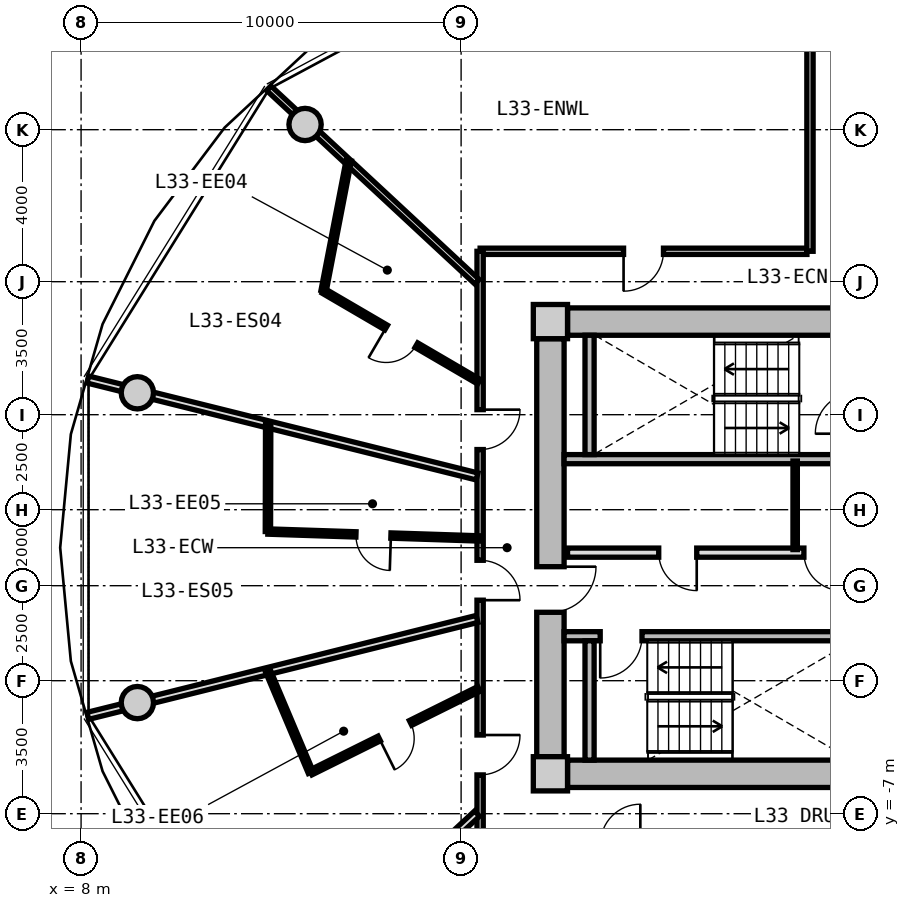
"""IFC4 building model, lengths in metres.
Left out: names, types, materials, properties, quantities, classifications, styles, units other than length and angle.
Written with IfcOpenShell. Run it as: python <this file> out.ifc"""

import sys

from ifc_helpers import new_model, si_unit, direction, frame, frame_2d, origin, origin_2d, place, context, subcontext, project, spatial, rectangle, circle, extrude, source, transform, mapped, element, fill, save


model = new_model("IFC4")
c1 = context("Model", 3, precision=1e-05, world=origin(), true_north=direction((0.0, 1.0)))
c2 = subcontext(c1, "Body", "Model", "MODEL_VIEW")
j1 = project(units=[si_unit("LENGTHUNIT", "METRE"), si_unit("PLANEANGLEUNIT", "RADIAN")], contexts=[c1])
p1 = place(None, origin())
s1 = spatial("IfcSite", under=j1, at=p1, CompositionType="ELEMENT")
p2 = place(p1, origin())
s2 = spatial("IfcBuilding", under=s1, at=p2, CompositionType="ELEMENT")
p3 = place(p2, frame((0.0, 0.0, 108.45)))
s3 = spatial("IfcBuildingStorey", under=s2, at=p3, CompositionType="ELEMENT", Elevation=108.45)
m1 = source(origin(), c2, "Body", "SweptSolid", [
    extrude(rectangle(XDim=0.9, YDim=0.9, at=origin_2d()), origin(), (0.0, 0.0, 1.0), 3.05),
])
for number, where, z_axis, x_axis in (
    (1, (20.35, -5.95, 0.0), (0.0, 0.0, 1.0), (1.0, 0.0, 0.0)),
    (2, (20.35, 5.95, 0.0), (0.0, 0.0, 1.0), (1.0, 0.0, 0.0)),
):
    element("IfcColumn", number, at=place(p3, frame(where, z_axis=z_axis, x_axis=x_axis)), inside=s3, PredefinedType="COLUMN", context=c2, shape_type="MappedRepresentation", body=[
        mapped(m1, transform((0.0, 0.0, 0.0), x_axis=(1.0, 0.0, 0.0), y_axis=(0.0, 1.0, 0.0), z_axis=(0.0, 0.0, 1.0), scale=1.0)),
    ])
m2 = source(origin(), c2, "Body", "SweptSolid", [
    extrude(rectangle(XDim=14.4, YDim=0.72, at=frame_2d((7.2, 0.0))), origin(), (0.0, 0.0, 1.0), 2.79),
])
for number, where, z_axis, x_axis in (
    (3, (20.8, 5.95, 0.0), (0.0, 0.0, 1.0), (1.0, 0.0, 0.0)),
    (4, (35.2, -5.95, 0.0), (0.0, 0.0, 1.0), (-1.0, 0.0, 0.0)),
):
    element("IfcWall", number, at=place(p3, frame(where, z_axis=z_axis, x_axis=x_axis)), inside=s3, PredefinedType="SHEAR", context=c2, shape_type="MappedRepresentation", body=[
        mapped(m2, transform((0.0, 0.0, 0.0), x_axis=(1.0, 0.0, 0.0), y_axis=(0.0, 1.0, 0.0), z_axis=(0.0, 0.0, 1.0), scale=1.0)),
    ])
m3 = source(origin(), c2, "Body", "SweptSolid", [
    extrude(rectangle(XDim=11.0, YDim=0.72, at=frame_2d((5.5, 0.0))), origin(), (0.0, 0.0, 1.0), 2.79),
])
p4 = place(p3, frame((20.35, -5.5, 0.0), z_axis=(0.0, 0.0, 1.0), x_axis=(0.0, 1.0, 0.0)))
e5 = element("IfcWall", 5, at=p4, inside=s3, PredefinedType="SHEAR", context=c2, shape_type="MappedRepresentation", body=[
    mapped(m3, transform((0.0, 0.0, 0.0), x_axis=(1.0, 0.0, 0.0), y_axis=(0.0, 1.0, 0.0), z_axis=(0.0, 0.0, 1.0), scale=1.0)),
])
p5 = place(p4, frame((3.8, 0.0, 0.0)))
e6 = element("IfcOpeningElement", 6, at=p5, cuts=e5, PredefinedType="OPENING", context=c2, shape_type="SweptSolid", body=[
    extrude(rectangle(XDim=1.2, YDim=2.15, at=frame_2d((0.6, 1.075))), frame((0.0, 0.37, 0.0), z_axis=(0.0, -1.0, 0.0), x_axis=(1.0, 0.0, 0.0)), (0.0, 0.0, 1.0), 0.74),
])
m4 = source(origin(), c2, "Body", "SweptSolid", [
    extrude(circle(Radius=0.425, at=origin_2d()), origin(), (0.0, 0.0, 1.0), 3.05),
])
for number, where, z_axis, x_axis in (
    (7, (13.894, 11.137, 0.0), (0.0, 0.0, 1.0), (1.0, 0.0, 0.0)),
    (8, (9.481, 4.076, 0.0), (0.0, 0.0, 1.0), (1.0, 0.0, 0.0)),
    (9, (9.481, -4.076, 0.0), (0.0, 0.0, 1.0), (1.0, 0.0, 0.0)),
):
    element("IfcColumn", number, at=place(p3, frame(where, z_axis=z_axis, x_axis=x_axis)), inside=s3, PredefinedType="COLUMN", context=c2, shape_type="MappedRepresentation", body=[
        mapped(m4, transform((0.0, 0.0, 0.0), x_axis=(1.0, 0.0, 0.0), y_axis=(0.0, 1.0, 0.0), z_axis=(0.0, 0.0, 1.0), scale=1.0)),
    ])
m5 = source(origin(), c2, "Body", "SweptSolid", [
    extrude(rectangle(XDim=7.83, YDim=0.24, at=frame_2d((3.915, 0.0))), origin(), (0.0, 0.0, 1.0), 2.79),
])
p6 = place(p3, frame((20.71, 2.33, 0.0), z_axis=(0.0, 0.0, 1.0), x_axis=(1.0, 0.0, 0.0)))
e10 = element("IfcWall", 10, at=p6, inside=s3, PredefinedType="PARTITIONING", context=c2, shape_type="MappedRepresentation", body=[
    mapped(m5, transform((0.0, 0.0, 0.0), x_axis=(1.0, 0.0, 0.0), y_axis=(0.0, 1.0, 0.0), z_axis=(0.0, 0.0, 1.0), scale=1.0)),
])
m6 = source(origin(), c2, "Body", "SweptSolid", [
    extrude(rectangle(XDim=3.14, YDim=0.24, at=frame_2d((1.57, 0.0))), origin(), (0.0, 0.0, 1.0), 2.79),
])
p7 = place(p3, frame((21.38, 2.45, 0.0), z_axis=(0.0, 0.0, 1.0), x_axis=(0.0, 1.0, 0.0)))
e11 = element("IfcWall", 11, at=p7, inside=s3, PredefinedType="PARTITIONING", context=c2, shape_type="MappedRepresentation", body=[
    mapped(m6, transform((0.0, 0.0, 0.0), x_axis=(1.0, 0.0, 0.0), y_axis=(0.0, 1.0, 0.0), z_axis=(0.0, 0.0, 1.0), scale=1.0)),
])
p8 = place(p3, frame((20.71, -2.33, 0.0), z_axis=(0.0, 0.0, 1.0), x_axis=(1.0, 0.0, 0.0)))
e12 = element("IfcWall", 12, at=p8, inside=s3, PredefinedType="PARTITIONING", context=c2, shape_type="MappedRepresentation", body=[
    mapped(m5, transform((0.0, 0.0, 0.0), x_axis=(1.0, 0.0, 0.0), y_axis=(0.0, 1.0, 0.0), z_axis=(0.0, 0.0, 1.0), scale=1.0)),
])
p9 = place(p8, frame((0.95, 0.0, 0.0)))
e13 = element("IfcOpeningElement", 13, at=p9, cuts=e12, PredefinedType="OPENING", context=c2, shape_type="SweptSolid", body=[
    extrude(rectangle(XDim=1.1, YDim=2.15, at=frame_2d((0.55, 1.075))), frame((0.0, 0.13, 0.0), z_axis=(0.0, -1.0, 0.0), x_axis=(1.0, 0.0, 0.0)), (0.0, 0.0, 1.0), 0.26),
])
p10 = place(p3, frame((21.38, -5.59, 0.0), z_axis=(0.0, 0.0, 1.0), x_axis=(0.0, 1.0, 0.0)))
e14 = element("IfcWall", 14, at=p10, inside=s3, PredefinedType="PARTITIONING", context=c2, shape_type="MappedRepresentation", body=[
    mapped(m6, transform((0.0, 0.0, 0.0), x_axis=(1.0, 0.0, 0.0), y_axis=(0.0, 1.0, 0.0), z_axis=(0.0, 0.0, 1.0), scale=1.0)),
])
m7 = source(origin(), c2, "Body", "SweptSolid", [
    extrude(rectangle(XDim=7.62, YDim=0.24, at=frame_2d((3.81, 0.0))), origin(), (0.0, 0.0, 1.0), 2.775),
])
p11 = place(p3, frame((20.8, -0.13, 0.0), z_axis=(0.0, 0.0, 1.0), x_axis=(1.0, 0.0, 0.0)))
e15 = element("IfcWall", 15, at=p11, inside=s3, PredefinedType="PARTITIONING", context=c2, shape_type="MappedRepresentation", body=[
    mapped(m7, transform((0.0, 0.0, 0.0), x_axis=(1.0, 0.0, 0.0), y_axis=(0.0, 1.0, 0.0), z_axis=(0.0, 0.0, 1.0), scale=1.0)),
])
p12 = place(p11, frame((6.22, 0.0, 0.0)))
e16 = element("IfcOpeningElement", 16, at=p12, cuts=e15, PredefinedType="OPENING", context=c2, shape_type="SweptSolid", body=[
    extrude(rectangle(XDim=1.0, YDim=2.1, at=frame_2d((0.5, 1.05))), frame((0.0, 0.13, 0.0), z_axis=(0.0, -1.0, 0.0), x_axis=(1.0, 0.0, 0.0)), (0.0, 0.0, 1.0), 0.26),
])
p13 = place(p11, frame((2.4, 0.0, 0.0)))
e17 = element("IfcOpeningElement", 17, at=p13, cuts=e15, PredefinedType="OPENING", context=c2, shape_type="SweptSolid", body=[
    extrude(rectangle(XDim=1.0, YDim=2.1, at=frame_2d((0.5, 1.05))), frame((0.0, 0.13, 0.0), z_axis=(0.0, -1.0, 0.0), x_axis=(1.0, 0.0, 0.0)), (0.0, 0.0, 1.0), 0.26),
])
m8 = source(origin(), c2, "Body", "SweptSolid", [
    extrude(rectangle(XDim=2.33, YDim=0.115, at=frame_2d((1.165, 0.0))), origin(), (0.0, 0.0, 1.0), 2.775),
])
p14 = place(p3, frame((26.79, -0.05, 0.0), z_axis=(0.0, 0.0, 1.0), x_axis=(0.0, 1.0, 0.0)))
e18 = element("IfcWall", 18, at=p14, inside=s3, PredefinedType="PARTITIONING", context=c2, shape_type="MappedRepresentation", body=[
    mapped(m8, transform((0.0, 0.0, 0.0), x_axis=(1.0, 0.0, 0.0), y_axis=(0.0, 1.0, 0.0), z_axis=(0.0, 0.0, 1.0), scale=1.0)),
])
m9 = source(origin(), c2, "Body", "SweptSolid", [
    extrude(rectangle(XDim=8.6, YDim=0.165, at=frame_2d((4.3, 0.0))), origin(), (0.0, 0.0, 1.0), 2.775),
])
p15 = place(p3, frame((18.5, 7.8, 0.0), z_axis=(0.0, 0.0, 1.0), x_axis=(1.0, 0.0, 0.0)))
e19 = element("IfcWall", 19, at=p15, inside=s3, PredefinedType="PARTITIONING", context=c2, shape_type="MappedRepresentation", body=[
    mapped(m9, transform((0.0, 0.0, 0.0), x_axis=(1.0, 0.0, 0.0), y_axis=(0.0, 1.0, 0.0), z_axis=(0.0, 0.0, 1.0), scale=1.0)),
])
p16 = place(p15, frame((3.775, 0.0, 0.0)))
e20 = element("IfcOpeningElement", 20, at=p16, cuts=e19, PredefinedType="OPENING", context=c2, shape_type="SweptSolid", body=[
    extrude(rectangle(XDim=1.05, YDim=2.15, at=frame_2d((0.525, 1.075))), frame((0.0, 0.093, 0.0), z_axis=(0.0, -1.0, 0.0), x_axis=(1.0, 0.0, 0.0)), (0.0, 0.0, 1.0), 0.185),
])
m10 = source(origin(), c2, "Body", "SweptSolid", [
    extrude(rectangle(XDim=15.6, YDim=0.165, at=frame_2d((7.8, 0.0))), origin(), (0.0, 0.0, 1.0), 2.775),
])
p17 = place(p3, frame((18.5, -7.8, 0.0), z_axis=(0.0, 0.0, 1.0), x_axis=(0.0, 1.0, 0.0)))
e21 = element("IfcWall", 21, at=p17, inside=s3, PredefinedType="PARTITIONING", context=c2, shape_type="MappedRepresentation", body=[
    mapped(m10, transform((0.0, 0.0, 0.0), x_axis=(1.0, 0.0, 0.0), y_axis=(0.0, 1.0, 0.0), z_axis=(0.0, 0.0, 1.0), scale=1.0)),
])
p18 = place(p17, frame((10.383, 0.0, 0.0)))
e22 = element("IfcOpeningElement", 22, at=p18, cuts=e21, PredefinedType="OPENING", context=c2, shape_type="SweptSolid", body=[
    extrude(rectangle(XDim=1.05, YDim=2.15, at=frame_2d((0.525, 1.075))), frame((0.0, 0.093, 0.0), z_axis=(0.0, -1.0, 0.0), x_axis=(1.0, 0.0, 0.0)), (0.0, 0.0, 1.0), 0.185),
])
p19 = place(p17, frame((6.419, 0.0, 0.0)))
e23 = element("IfcOpeningElement", 23, at=p19, cuts=e21, PredefinedType="OPENING", context=c2, shape_type="SweptSolid", body=[
    extrude(rectangle(XDim=1.05, YDim=2.15, at=frame_2d((0.525, 1.075))), frame((0.0, 0.093, 0.0), z_axis=(0.0, -1.0, 0.0), x_axis=(1.0, 0.0, 0.0)), (0.0, 0.0, 1.0), 0.185),
])
p20 = place(p17, frame((1.821, 0.0, 0.0)))
e24 = element("IfcOpeningElement", 24, at=p20, cuts=e21, PredefinedType="OPENING", context=c2, shape_type="SweptSolid", body=[
    extrude(rectangle(XDim=1.05, YDim=2.15, at=frame_2d((0.525, 1.075))), frame((0.0, 0.093, 0.0), z_axis=(0.0, -1.0, 0.0), x_axis=(1.0, 0.0, 0.0)), (0.0, 0.0, 1.0), 0.185),
])
m11 = source(origin(), c2, "Body", "SweptSolid", [
    extrude(rectangle(XDim=7.482, YDim=0.165, at=frame_2d((3.741, 0.0))), origin(), (0.0, 0.0, 1.0), 2.275),
])
p21 = place(p3, frame((18.42, 6.998, 0.0), z_axis=(0.0, 0.0, 1.0), x_axis=(-0.732508698043, 0.680757671489, 0.0)))
e25 = element("IfcWall", 25, at=p21, inside=s3, PredefinedType="PARTITIONING", context=c2, shape_type="MappedRepresentation", body=[
    mapped(m11, transform((0.0, 0.0, 0.0), x_axis=(1.0, 0.0, 0.0), y_axis=(0.0, 1.0, 0.0), z_axis=(0.0, 0.0, 1.0), scale=1.0)),
])
m12 = source(origin(), c2, "Body", "SweptSolid", [
    extrude(rectangle(XDim=7.56, YDim=0.165, at=frame_2d((3.78, 0.0))), origin(), (0.0, 0.0, 1.0), 2.775),
])
p22 = place(p3, frame((27.18, 7.8, 0.0), z_axis=(0.0, 0.0, 1.0), x_axis=(0.0, 1.0, 0.0)))
e26 = element("IfcWall", 26, at=p22, inside=s3, PredefinedType="PARTITIONING", context=c2, shape_type="MappedRepresentation", body=[
    mapped(m12, transform((0.0, 0.0, 0.0), x_axis=(1.0, 0.0, 0.0), y_axis=(0.0, 1.0, 0.0), z_axis=(0.0, 0.0, 1.0), scale=1.0)),
])
m13 = source(origin(), c2, "Body", "SweptSolid", [
    extrude(rectangle(XDim=10.556, YDim=0.19, at=frame_2d((5.278, 0.0))), origin(), (0.0, 0.0, 1.0), 2.275),
])
p23 = place(p3, frame((18.42, 1.875, 0.0), z_axis=(0.0, 0.0, 1.0), x_axis=(-0.970363857851, 0.241648470667, 0.0)))
e27 = element("IfcWall", 27, at=p23, inside=s3, PredefinedType="PARTITIONING", context=c2, shape_type="MappedRepresentation", body=[
    mapped(m13, transform((0.0, 0.0, 0.0), x_axis=(1.0, 0.0, 0.0), y_axis=(0.0, 1.0, 0.0), z_axis=(0.0, 0.0, 1.0), scale=1.0)),
])
m14 = source(origin(), c2, "Body", "SweptSolid", [
    extrude(rectangle(XDim=4.735, YDim=0.14, at=frame_2d((2.368, 0.0))), origin(), (0.0, 0.0, 1.0), 2.775),
])
p24 = place(p3, frame((18.47, 4.368, 0.0), z_axis=(0.0, 0.0, 1.0), x_axis=(-0.863537576642, 0.504284496814, 0.0)))
e28 = element("IfcWall", 28, at=p24, inside=s3, PredefinedType="PARTITIONING", context=c2, shape_type="MappedRepresentation", body=[
    mapped(m14, transform((0.0, 0.0, 0.0), x_axis=(1.0, 0.0, 0.0), y_axis=(0.0, 1.0, 0.0), z_axis=(0.0, 0.0, 1.0), scale=1.0)),
])
p25 = place(p24, frame((1.908, 0.0, 0.0)))
e29 = element("IfcOpeningElement", 29, at=p25, cuts=e28, PredefinedType="OPENING", context=c2, shape_type="SweptSolid", body=[
    extrude(rectangle(XDim=0.92, YDim=2.1, at=frame_2d((0.46, 1.05))), frame((0.0, 0.08, 0.0), z_axis=(0.0, -1.0, 0.0), x_axis=(1.0, 0.0, 0.0)), (0.0, 0.0, 1.0), 0.16),
])
m15 = source(origin(), c2, "Body", "SweptSolid", [
    extrude(rectangle(XDim=3.499, YDim=0.14, at=frame_2d((1.75, 0.0))), origin(), (0.0, 0.0, 1.0), 2.775),
])
p26 = place(p3, frame((14.381, 6.756, 0.0), z_axis=(0.0, 0.0, 1.0), x_axis=(0.18957713629, 0.981865830649, 0.0)))
e30 = element("IfcWall", 30, at=p26, inside=s3, PredefinedType="PARTITIONING", context=c2, shape_type="MappedRepresentation", body=[
    mapped(m15, transform((0.0, 0.0, 0.0), x_axis=(1.0, 0.0, 0.0), y_axis=(0.0, 1.0, 0.0), z_axis=(0.0, 0.0, 1.0), scale=1.0)),
])
p27 = place(p3, frame((18.42, -1.875, 0.0), z_axis=(0.0, 0.0, 1.0), x_axis=(-0.970363857851, -0.241648470667, 0.0)))
e31 = element("IfcWall", 31, at=p27, inside=s3, PredefinedType="PARTITIONING", context=c2, shape_type="MappedRepresentation", body=[
    mapped(m13, transform((0.0, 0.0, 0.0), x_axis=(1.0, 0.0, 0.0), y_axis=(0.0, 1.0, 0.0), z_axis=(0.0, 0.0, 1.0), scale=1.0)),
])
m16 = source(origin(), c2, "Body", "SweptSolid", [
    extrude(rectangle(XDim=5.557, YDim=0.14, at=frame_2d((2.778, 0.0))), origin(), (0.0, 0.0, 1.0), 2.775),
])
p28 = place(p3, frame((18.47, 0.244, 0.0), z_axis=(0.0, 0.0, 1.0), x_axis=(-0.999468495627, 0.03259948234, 0.0)))
e32 = element("IfcWall", 32, at=p28, inside=s3, PredefinedType="PARTITIONING", context=c2, shape_type="MappedRepresentation", body=[
    mapped(m16, transform((0.0, 0.0, 0.0), x_axis=(1.0, 0.0, 0.0), y_axis=(0.0, 1.0, 0.0), z_axis=(0.0, 0.0, 1.0), scale=1.0)),
])
p29 = place(p28, frame((2.318, 0.0, 0.0)))
e33 = element("IfcOpeningElement", 33, at=p29, cuts=e32, PredefinedType="OPENING", context=c2, shape_type="SweptSolid", body=[
    extrude(rectangle(XDim=0.92, YDim=2.1, at=frame_2d((0.46, 1.05))), frame((0.0, 0.08, 0.0), z_axis=(0.0, -1.0, 0.0), x_axis=(1.0, 0.0, 0.0)), (0.0, 0.0, 1.0), 0.16),
])
m17 = source(origin(), c2, "Body", "SweptSolid", [
    extrude(rectangle(XDim=2.837, YDim=0.14, at=frame_2d((1.418, 0.0))), origin(), (0.0, 0.0, 1.0), 2.775),
])
p30 = place(p3, frame((12.916, 0.425, 0.0), z_axis=(0.0, 0.0, 1.0), x_axis=(0.002409838945, 0.999997096334, 0.0)))
e34 = element("IfcWall", 34, at=p30, inside=s3, PredefinedType="PARTITIONING", context=c2, shape_type="MappedRepresentation", body=[
    mapped(m17, transform((0.0, 0.0, 0.0), x_axis=(1.0, 0.0, 0.0), y_axis=(0.0, 1.0, 0.0), z_axis=(0.0, 0.0, 1.0), scale=1.0)),
])
m18 = source(origin(), c2, "Body", "SweptSolid", [
    extrude(rectangle(XDim=7.482, YDim=0.19, at=frame_2d((3.741, 0.0))), origin(), (0.0, 0.0, 1.0), 2.275),
])
p31 = place(p3, frame((18.42, -6.998, 0.0), z_axis=(0.0, 0.0, 1.0), x_axis=(-0.732508698043, -0.680757671489, 0.0)))
e35 = element("IfcWall", 35, at=p31, inside=s3, PredefinedType="PARTITIONING", context=c2, shape_type="MappedRepresentation", body=[
    mapped(m18, transform((0.0, 0.0, 0.0), x_axis=(1.0, 0.0, 0.0), y_axis=(0.0, 1.0, 0.0), z_axis=(0.0, 0.0, 1.0), scale=1.0)),
])
m19 = source(origin(), c2, "Body", "SweptSolid", [
    extrude(rectangle(XDim=4.941, YDim=0.14, at=frame_2d((2.471, 0.0))), origin(), (0.0, 0.0, 1.0), 2.775),
])
p32 = place(p3, frame((18.47, -3.717, 0.0), z_axis=(0.0, 0.0, 1.0), x_axis=(-0.89555083256, -0.444959218694, 0.0)))
e36 = element("IfcWall", 36, at=p32, inside=s3, PredefinedType="PARTITIONING", context=c2, shape_type="MappedRepresentation", body=[
    mapped(m19, transform((0.0, 0.0, 0.0), x_axis=(1.0, 0.0, 0.0), y_axis=(0.0, 1.0, 0.0), z_axis=(0.0, 0.0, 1.0), scale=1.0)),
])
p33 = place(p32, frame((2.011, 0.0, 0.0)))
e37 = element("IfcOpeningElement", 37, at=p33, cuts=e36, PredefinedType="OPENING", context=c2, shape_type="SweptSolid", body=[
    extrude(rectangle(XDim=0.92, YDim=2.1, at=frame_2d((0.46, 1.05))), frame((0.0, 0.08, 0.0), z_axis=(0.0, -1.0, 0.0), x_axis=(1.0, 0.0, 0.0)), (0.0, 0.0, 1.0), 0.16),
])
m20 = source(origin(), c2, "Body", "SweptSolid", [
    extrude(rectangle(XDim=2.88, YDim=0.14, at=frame_2d((1.44, 0.0))), origin(), (0.0, 0.0, 1.0), 2.415),
])
p34 = place(p3, frame((14.045, -5.915, 0.0), z_axis=(0.0, 0.0, 1.0), x_axis=(-0.38878819597, 0.921327161585, 0.0)))
e38 = element("IfcWall", 38, at=p34, inside=s3, PredefinedType="PARTITIONING", context=c2, shape_type="MappedRepresentation", body=[
    mapped(m20, transform((0.0, 0.0, 0.0), x_axis=(1.0, 0.0, 0.0), y_axis=(0.0, 1.0, 0.0), z_axis=(0.0, 0.0, 1.0), scale=1.0)),
])
m21 = source(origin(), c2, "Body", "SweptSolid", [
    extrude(rectangle(XDim=1.1, YDim=2.15, at=frame_2d((0.55, 1.075))), frame((0.0, 0.025, 0.0), z_axis=(0.0, -1.0, 0.0), x_axis=(1.0, 0.0, 0.0)), (0.0, 0.0, 1.0), 0.05),
])
p35 = place(p9, frame((1.1, 0.0, 0.0), z_axis=(0.0, 0.0, 1.0), x_axis=(-1.0, 0.0, 0.0)))
e39 = element("IfcDoor", 39, at=p35, inside=s3, OperationType="SINGLE_SWING_RIGHT", PredefinedType="DOOR", context=c2, shape_type="MappedRepresentation", body=[
    mapped(m21, transform((0.0, 0.0, 0.0), x_axis=(1.0, 0.0, 0.0), y_axis=(0.0, 1.0, 0.0), z_axis=(0.0, 0.0, 1.0), scale=1.0)),
])
fill(e13, e39)
m22 = source(origin(), c2, "Body", "SweptSolid", [
    extrude(rectangle(XDim=1.2, YDim=2.15, at=frame_2d((0.6, 1.075))), frame((0.0, 0.025, 0.0), z_axis=(0.0, -1.0, 0.0), x_axis=(1.0, 0.0, 0.0)), (0.0, 0.0, 1.0), 0.05),
])
p36 = place(p5, frame((1.2, 0.0, 0.0), z_axis=(0.0, 0.0, 1.0), x_axis=(-1.0, 0.0, 0.0)))
e40 = element("IfcDoor", 40, at=p36, inside=s3, OperationType="SINGLE_SWING_LEFT", PredefinedType="DOOR", context=c2, shape_type="MappedRepresentation", body=[
    mapped(m22, transform((0.0, 0.0, 0.0), x_axis=(1.0, 0.0, 0.0), y_axis=(0.0, 1.0, 0.0), z_axis=(0.0, 0.0, 1.0), scale=1.0)),
])
fill(e6, e40)
m23 = source(origin(), c2, "Body", "SweptSolid", [
    extrude(rectangle(XDim=1.0, YDim=2.1, at=frame_2d((0.5, 1.05))), frame((0.0, 0.025, 0.0), z_axis=(0.0, -1.0, 0.0), x_axis=(1.0, 0.0, 0.0)), (0.0, 0.0, 1.0), 0.05),
])
p37 = place(p12, frame((1.0, 0.0, 0.0), z_axis=(0.0, 0.0, 1.0), x_axis=(-1.0, 0.0, 0.0)))
e41 = element("IfcDoor", 41, at=p37, inside=s3, OperationType="SINGLE_SWING_LEFT", PredefinedType="DOOR", context=c2, shape_type="MappedRepresentation", body=[
    mapped(m23, transform((0.0, 0.0, 0.0), x_axis=(1.0, 0.0, 0.0), y_axis=(0.0, 1.0, 0.0), z_axis=(0.0, 0.0, 1.0), scale=1.0)),
])
fill(e16, e41)
p38 = place(p13, frame((1.0, 0.0, 0.0), z_axis=(0.0, 0.0, 1.0), x_axis=(-1.0, 0.0, 0.0)))
e42 = element("IfcDoor", 42, at=p38, inside=s3, OperationType="SINGLE_SWING_LEFT", PredefinedType="DOOR", context=c2, shape_type="MappedRepresentation", body=[
    mapped(m23, transform((0.0, 0.0, 0.0), x_axis=(1.0, 0.0, 0.0), y_axis=(0.0, 1.0, 0.0), z_axis=(0.0, 0.0, 1.0), scale=1.0)),
])
fill(e17, e42)
m24 = source(origin(), c2, "Body", "SweptSolid", [
    extrude(rectangle(XDim=1.05, YDim=2.15, at=frame_2d((0.525, 1.075))), frame((0.0, 0.025, 0.0), z_axis=(0.0, -1.0, 0.0), x_axis=(1.0, 0.0, 0.0)), (0.0, 0.0, 1.0), 0.05),
])
p39 = place(p16, frame((1.05, 0.0, 0.0), z_axis=(0.0, 0.0, 1.0), x_axis=(-1.0, 0.0, 0.0)))
e43 = element("IfcDoor", 43, at=p39, inside=s3, OperationType="SINGLE_SWING_RIGHT", PredefinedType="DOOR", context=c2, shape_type="MappedRepresentation", body=[
    mapped(m24, transform((0.0, 0.0, 0.0), x_axis=(1.0, 0.0, 0.0), y_axis=(0.0, 1.0, 0.0), z_axis=(0.0, 0.0, 1.0), scale=1.0)),
])
fill(e20, e43)
p40 = place(p18, frame((1.05, 0.0, 0.0), z_axis=(0.0, 0.0, 1.0), x_axis=(-1.0, 0.0, 0.0)))
e44 = element("IfcDoor", 44, at=p40, inside=s3, OperationType="SINGLE_SWING_LEFT", PredefinedType="DOOR", context=c2, shape_type="MappedRepresentation", body=[
    mapped(m24, transform((0.0, 0.0, 0.0), x_axis=(1.0, 0.0, 0.0), y_axis=(0.0, 1.0, 0.0), z_axis=(0.0, 0.0, 1.0), scale=1.0)),
])
fill(e22, e44)
m25 = source(origin(), c2, "Body", "SweptSolid", [
    extrude(rectangle(XDim=0.92, YDim=2.1, at=frame_2d((0.46, 1.05))), frame((0.0, 0.025, 0.0), z_axis=(0.0, -1.0, 0.0), x_axis=(1.0, 0.0, 0.0)), (0.0, 0.0, 1.0), 0.05),
])
p41 = place(p25, origin())
e45 = element("IfcDoor", 45, at=p41, inside=s3, OperationType="SINGLE_SWING_RIGHT", PredefinedType="DOOR", context=c2, shape_type="MappedRepresentation", body=[
    mapped(m25, transform((0.0, 0.0, 0.0), x_axis=(1.0, 0.0, 0.0), y_axis=(0.0, 1.0, 0.0), z_axis=(0.0, 0.0, 1.0), scale=1.0)),
])
fill(e29, e45)
p42 = place(p19, frame((1.05, 0.0, 0.0), z_axis=(0.0, 0.0, 1.0), x_axis=(-1.0, 0.0, 0.0)))
e46 = element("IfcDoor", 46, at=p42, inside=s3, OperationType="SINGLE_SWING_RIGHT", PredefinedType="DOOR", context=c2, shape_type="MappedRepresentation", body=[
    mapped(m24, transform((0.0, 0.0, 0.0), x_axis=(1.0, 0.0, 0.0), y_axis=(0.0, 1.0, 0.0), z_axis=(0.0, 0.0, 1.0), scale=1.0)),
])
fill(e23, e46)
p43 = place(p29, origin())
e47 = element("IfcDoor", 47, at=p43, inside=s3, OperationType="SINGLE_SWING_LEFT", PredefinedType="DOOR", context=c2, shape_type="MappedRepresentation", body=[
    mapped(m25, transform((0.0, 0.0, 0.0), x_axis=(1.0, 0.0, 0.0), y_axis=(0.0, 1.0, 0.0), z_axis=(0.0, 0.0, 1.0), scale=1.0)),
])
fill(e33, e47)
p44 = place(p20, frame((1.05, 0.0, 0.0), z_axis=(0.0, 0.0, 1.0), x_axis=(-1.0, 0.0, 0.0)))
e48 = element("IfcDoor", 48, at=p44, inside=s3, OperationType="SINGLE_SWING_LEFT", PredefinedType="DOOR", context=c2, shape_type="MappedRepresentation", body=[
    mapped(m24, transform((0.0, 0.0, 0.0), x_axis=(1.0, 0.0, 0.0), y_axis=(0.0, 1.0, 0.0), z_axis=(0.0, 0.0, 1.0), scale=1.0)),
])
fill(e24, e48)
p45 = place(p33, origin())
e49 = element("IfcDoor", 49, at=p45, inside=s3, OperationType="SINGLE_SWING_RIGHT", PredefinedType="DOOR", context=c2, shape_type="MappedRepresentation", body=[
    mapped(m25, transform((0.0, 0.0, 0.0), x_axis=(1.0, 0.0, 0.0), y_axis=(0.0, 1.0, 0.0), z_axis=(0.0, 0.0, 1.0), scale=1.0)),
])
fill(e37, e49)
save(model, sys.argv[1])
